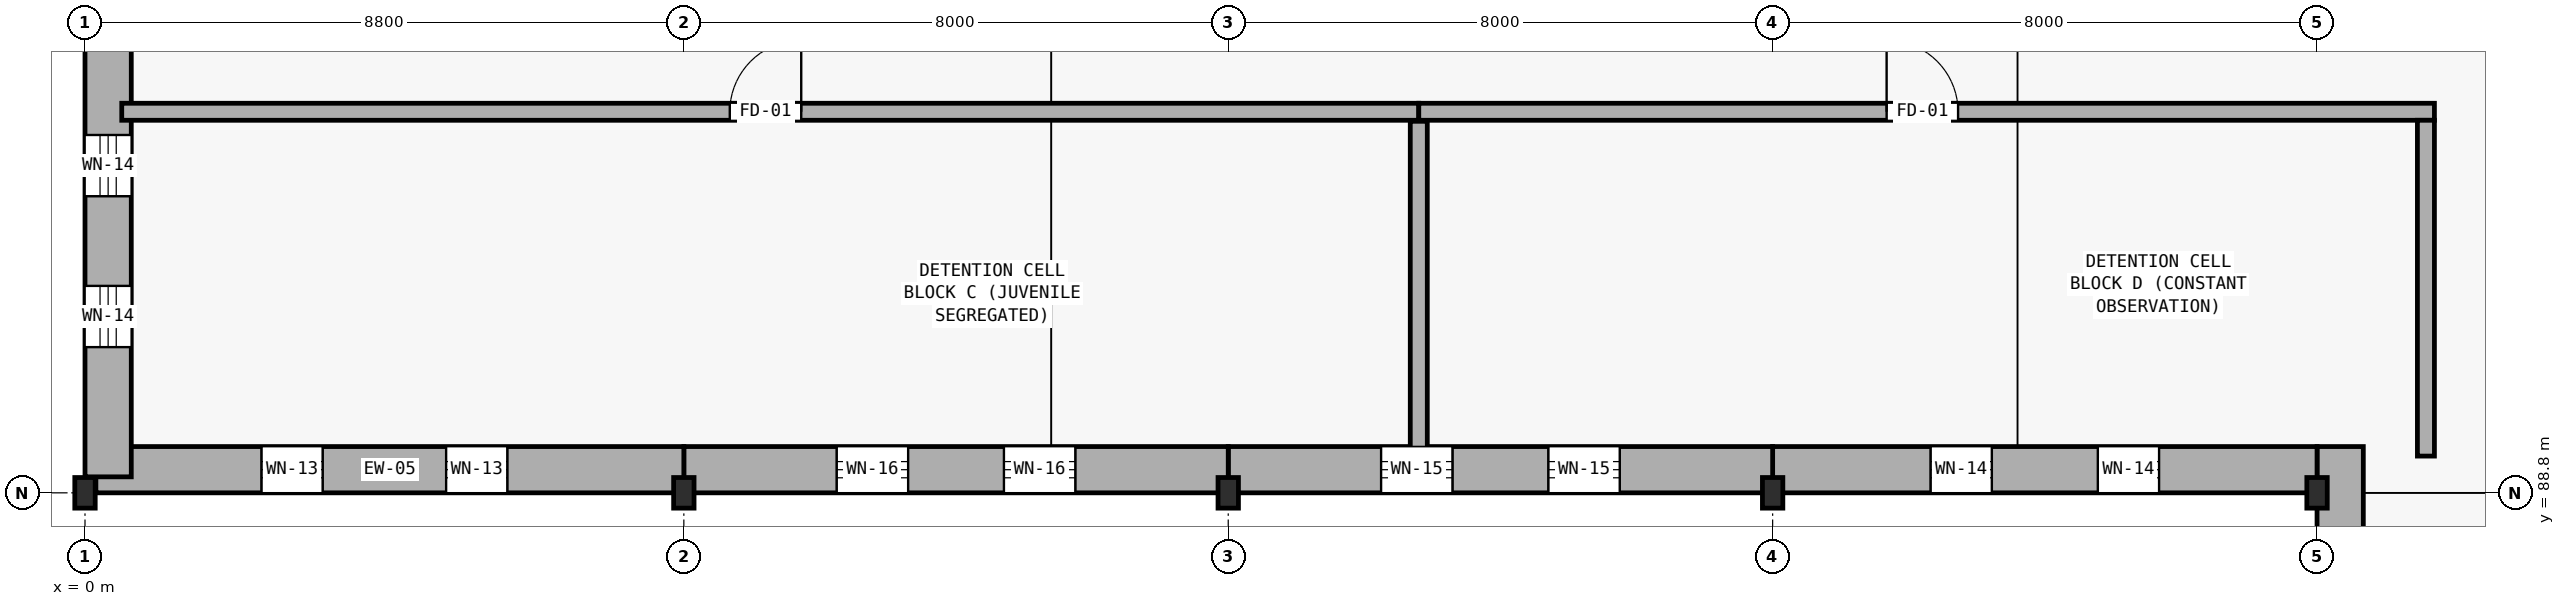
"""IFC4 building model, lengths in metres.
Left out: names, types, materials, properties, quantities, classifications, styles, units other than length and angle.
Written with IfcOpenShell. Run it as: python <this file> out.ifc"""

import sys

from ifc_helpers import new_model, si_unit, direction, frame, frame_2d, origin, origin_2d, place, context, subcontext, project, spatial, rectangle, i_section, extrude, element, fill, save


model = new_model("IFC4")
c1 = context("Model", 3, precision=1e-05, world=origin(), true_north=direction((0.0, 1.0)))
c2 = subcontext(c1, "Body", "Model", "MODEL_VIEW")
j1 = project(units=[si_unit("LENGTHUNIT", "METRE"), si_unit("PLANEANGLEUNIT", "RADIAN")], contexts=[c1])
p1 = place(None, origin())
s1 = spatial("IfcSite", under=j1, at=p1, CompositionType="ELEMENT")
p2 = place(p1, origin())
s2 = spatial("IfcBuilding", under=s1, at=p2, CompositionType="ELEMENT")
p3 = place(p2, frame((0.0, 0.0, 5.4)))
s3 = spatial("IfcBuildingStorey", under=s2, at=p3, CompositionType="ELEMENT", Elevation=5.4)
for number, where, z_axis, x_axis in (
    (1, (0.0, 88.8, 0.0), (0.0, 0.0, 1.0), (1.0, 0.0, 0.0)),
    (2, (8.8, 88.8, 0.0), (0.0, 0.0, 1.0), (1.0, 0.0, 0.0)),
    (3, (16.8, 88.8, 0.0), (0.0, 0.0, 1.0), (1.0, 0.0, 0.0)),
    (4, (24.8, 88.8, 0.0), (0.0, 0.0, 1.0), (1.0, 0.0, 0.0)),
    (5, (32.8, 88.8, 0.0), (0.0, 0.0, 1.0), (1.0, 0.0, 0.0)),
):
    element("IfcColumn", number, at=place(p3, frame(where, z_axis=z_axis, x_axis=x_axis)), inside=s3, PredefinedType="COLUMN", context=c2, shape_type="SweptSolid", body=[
        extrude(i_section(OverallWidth=0.3, OverallDepth=0.45, WebThickness=0.014, FlangeThickness=0.026, FilletRadius=0.027, at=origin_2d()), origin(), (0.0, 0.0, 1.0), 4.5),
    ])
p4 = place(p3, frame((33.14, 81.4, 0.0), z_axis=(0.0, 0.0, 1.0), x_axis=(0.0, 1.0, 0.0)))
e6 = element("IfcWall", 6, at=p4, inside=s3, PredefinedType="SOLIDWALL", context=c2, shape_type="SweptSolid", body=[
    extrude(rectangle(XDim=8.08, YDim=0.68, at=frame_2d((4.04, 0.0))), origin(), (0.0, 0.0, 1.0), 4.22),
])
p5 = place(p4, frame((2.141, 0.0, 1.8)))
e7 = element("IfcOpeningElement", 7, at=p5, cuts=e6, PredefinedType="OPENING", context=c2, shape_type="SweptSolid", body=[
    extrude(rectangle(XDim=0.9, YDim=0.9, at=frame_2d((0.45, 0.45))), frame((0.0, 0.35, 0.0), z_axis=(0.0, -1.0, 0.0), x_axis=(1.0, 0.0, 0.0)), (0.0, 0.0, 1.0), 0.7),
])
p6 = place(p4, frame((4.359, 0.0, 1.8)))
e8 = element("IfcOpeningElement", 8, at=p6, cuts=e6, PredefinedType="OPENING", context=c2, shape_type="SweptSolid", body=[
    extrude(rectangle(XDim=0.9, YDim=0.9, at=frame_2d((0.45, 0.45))), frame((0.0, 0.35, 0.0), z_axis=(0.0, -1.0, 0.0), x_axis=(1.0, 0.0, 0.0)), (0.0, 0.0, 1.0), 0.7),
])
p7 = place(p3, frame((32.8, 89.14, 0.0), z_axis=(0.0, 0.0, 1.0), x_axis=(-1.0, 0.0, 0.0)))
e9 = element("IfcWall", 9, at=p7, inside=s3, PredefinedType="SOLIDWALL", context=c2, shape_type="SweptSolid", body=[
    extrude(rectangle(XDim=8.0, YDim=0.68, at=frame_2d((4.0, 0.0))), origin(), (0.0, 0.0, 1.0), 4.22),
])
p8 = place(p7, frame((2.321, 0.0, 1.8)))
e10 = element("IfcOpeningElement", 10, at=p8, cuts=e9, PredefinedType="OPENING", context=c2, shape_type="SweptSolid", body=[
    extrude(rectangle(XDim=0.9, YDim=1.15, at=frame_2d((0.45, 0.575))), frame((0.0, 0.35, 0.0), z_axis=(0.0, -1.0, 0.0), x_axis=(1.0, 0.0, 0.0)), (0.0, 0.0, 1.0), 0.7),
])
p9 = place(p7, frame((4.779, 0.0, 1.8)))
e11 = element("IfcOpeningElement", 11, at=p9, cuts=e9, PredefinedType="OPENING", context=c2, shape_type="SweptSolid", body=[
    extrude(rectangle(XDim=0.9, YDim=1.15, at=frame_2d((0.45, 0.575))), frame((0.0, 0.35, 0.0), z_axis=(0.0, -1.0, 0.0), x_axis=(1.0, 0.0, 0.0)), (0.0, 0.0, 1.0), 0.7),
])
p10 = place(p3, frame((24.8, 89.14, 0.0), z_axis=(0.0, 0.0, 1.0), x_axis=(-1.0, 0.0, 0.0)))
e12 = element("IfcWall", 12, at=p10, inside=s3, PredefinedType="SOLIDWALL", context=c2, shape_type="SweptSolid", body=[
    extrude(rectangle(XDim=8.0, YDim=0.68, at=frame_2d((4.0, 0.0))), origin(), (0.0, 0.0, 1.0), 4.22),
])
p11 = place(p10, frame((2.246, 0.0, 1.8)))
e13 = element("IfcOpeningElement", 13, at=p11, cuts=e12, PredefinedType="OPENING", context=c2, shape_type="SweptSolid", body=[
    extrude(rectangle(XDim=1.05, YDim=0.95, at=frame_2d((0.525, 0.475))), frame((0.0, 0.35, 0.0), z_axis=(0.0, -1.0, 0.0), x_axis=(1.0, 0.0, 0.0)), (0.0, 0.0, 1.0), 0.7),
])
p12 = place(p10, frame((4.704, 0.0, 1.8)))
e14 = element("IfcOpeningElement", 14, at=p12, cuts=e12, PredefinedType="OPENING", context=c2, shape_type="SweptSolid", body=[
    extrude(rectangle(XDim=1.05, YDim=0.95, at=frame_2d((0.525, 0.475))), frame((0.0, 0.35, 0.0), z_axis=(0.0, -1.0, 0.0), x_axis=(1.0, 0.0, 0.0)), (0.0, 0.0, 1.0), 0.7),
])
p13 = place(p3, frame((16.8, 89.14, 0.0), z_axis=(0.0, 0.0, 1.0), x_axis=(-1.0, 0.0, 0.0)))
e15 = element("IfcWall", 15, at=p13, inside=s3, PredefinedType="SOLIDWALL", context=c2, shape_type="SweptSolid", body=[
    extrude(rectangle(XDim=8.0, YDim=0.68, at=frame_2d((4.0, 0.0))), origin(), (0.0, 0.0, 1.0), 4.22),
])
p14 = place(p13, frame((2.246, 0.0, 1.8)))
e16 = element("IfcOpeningElement", 16, at=p14, cuts=e15, PredefinedType="OPENING", context=c2, shape_type="SweptSolid", body=[
    extrude(rectangle(XDim=1.05, YDim=1.2, at=frame_2d((0.525, 0.6))), frame((0.0, 0.35, 0.0), z_axis=(0.0, -1.0, 0.0), x_axis=(1.0, 0.0, 0.0)), (0.0, 0.0, 1.0), 0.7),
])
p15 = place(p13, frame((4.704, 0.0, 1.8)))
e17 = element("IfcOpeningElement", 17, at=p15, cuts=e15, PredefinedType="OPENING", context=c2, shape_type="SweptSolid", body=[
    extrude(rectangle(XDim=1.05, YDim=1.2, at=frame_2d((0.525, 0.6))), frame((0.0, 0.35, 0.0), z_axis=(0.0, -1.0, 0.0), x_axis=(1.0, 0.0, 0.0)), (0.0, 0.0, 1.0), 0.7),
])
p16 = place(p3, frame((8.8, 89.14, 0.0), z_axis=(0.0, 0.0, 1.0), x_axis=(-1.0, 0.0, 0.0)))
e18 = element("IfcWall", 18, at=p16, inside=s3, PredefinedType="SOLIDWALL", context=c2, shape_type="SweptSolid", body=[
    extrude(rectangle(XDim=8.64, YDim=0.68, at=frame_2d((4.32, 0.0))), origin(), (0.0, 0.0, 1.0), 4.22),
])
p17 = place(p16, frame((2.593, 0.0, 1.8)))
e19 = element("IfcOpeningElement", 19, at=p17, cuts=e18, PredefinedType="OPENING", context=c2, shape_type="SweptSolid", body=[
    extrude(rectangle(XDim=0.9, YDim=0.9, at=frame_2d((0.45, 0.45))), frame((0.0, 0.35, 0.0), z_axis=(0.0, -1.0, 0.0), x_axis=(1.0, 0.0, 0.0)), (0.0, 0.0, 1.0), 0.7),
])
p18 = place(p16, frame((5.307, 0.0, 1.8)))
e20 = element("IfcOpeningElement", 20, at=p18, cuts=e18, PredefinedType="OPENING", context=c2, shape_type="SweptSolid", body=[
    extrude(rectangle(XDim=0.9, YDim=0.9, at=frame_2d((0.45, 0.45))), frame((0.0, 0.35, 0.0), z_axis=(0.0, -1.0, 0.0), x_axis=(1.0, 0.0, 0.0)), (0.0, 0.0, 1.0), 0.7),
])
p19 = place(p3, frame((0.34, 89.035, 0.0), z_axis=(0.0, 0.0, 1.0), x_axis=(0.0, 1.0, 0.0)))
e21 = element("IfcWall", 21, at=p19, inside=s3, PredefinedType="SOLIDWALL", context=c2, shape_type="SweptSolid", body=[
    extrude(rectangle(XDim=7.165, YDim=0.68, at=frame_2d((3.583, 0.0))), origin(), (0.0, 0.0, 1.0), 4.22),
])
p20 = place(p19, frame((1.906, 0.0, 1.8)))
e22 = element("IfcOpeningElement", 22, at=p20, cuts=e21, PredefinedType="OPENING", context=c2, shape_type="SweptSolid", body=[
    extrude(rectangle(XDim=0.9, YDim=1.15, at=frame_2d((0.45, 0.575))), frame((0.0, 0.35, 0.0), z_axis=(0.0, -1.0, 0.0), x_axis=(1.0, 0.0, 0.0)), (0.0, 0.0, 1.0), 0.7),
])
p21 = place(p19, frame((4.124, 0.0, 1.8)))
e23 = element("IfcOpeningElement", 23, at=p21, cuts=e21, PredefinedType="OPENING", context=c2, shape_type="SweptSolid", body=[
    extrude(rectangle(XDim=0.9, YDim=1.15, at=frame_2d((0.45, 0.575))), frame((0.0, 0.35, 0.0), z_axis=(0.0, -1.0, 0.0), x_axis=(1.0, 0.0, 0.0)), (0.0, 0.0, 1.0), 0.7),
])
p22 = place(p3, frame((0.54, 94.4, 0.0), z_axis=(0.0, 0.0, 1.0), x_axis=(1.0, 0.0, 0.0)))
e24 = element("IfcWall", 24, at=p22, inside=s3, PredefinedType="SOLIDWALL", context=c2, shape_type="SweptSolid", body=[
    extrude(rectangle(XDim=19.06, YDim=0.25, at=frame_2d((9.53, 0.0))), origin(), (0.0, 0.0, 1.0), 3.71),
])
p23 = place(p22, frame((8.935, 0.0, 0.0)))
e25 = element("IfcOpeningElement", 25, at=p23, cuts=e24, PredefinedType="OPENING", context=c2, shape_type="SweptSolid", body=[
    extrude(rectangle(XDim=1.05, YDim=2.15, at=frame_2d((0.525, 1.075))), frame((0.0, 0.135, 0.0), z_axis=(0.0, -1.0, 0.0), x_axis=(1.0, 0.0, 0.0)), (0.0, 0.0, 1.0), 0.27),
])
p24 = place(p3, frame((19.6, 89.34, 0.0), z_axis=(0.0, 0.0, 1.0), x_axis=(0.0, 1.0, 0.0)))
e26 = element("IfcWall", 26, at=p24, inside=s3, PredefinedType="SOLIDWALL", context=c2, shape_type="SweptSolid", body=[
    extrude(rectangle(XDim=4.92, YDim=0.25, at=frame_2d((2.46, 0.0))), origin(), (0.0, 0.0, 1.0), 3.84),
])
p25 = place(p3, frame((19.6, 94.4, 0.0), z_axis=(0.0, 0.0, 1.0), x_axis=(1.0, 0.0, 0.0)))
e27 = element("IfcWall", 27, at=p25, inside=s3, PredefinedType="SOLIDWALL", context=c2, shape_type="SweptSolid", body=[
    extrude(rectangle(XDim=14.925, YDim=0.25, at=frame_2d((7.462, 0.0))), origin(), (0.0, 0.0, 1.0), 3.71),
])
p26 = place(p25, frame((6.875, 0.0, 0.0)))
e28 = element("IfcOpeningElement", 28, at=p26, cuts=e27, PredefinedType="OPENING", context=c2, shape_type="SweptSolid", body=[
    extrude(rectangle(XDim=1.05, YDim=2.15, at=frame_2d((0.525, 1.075))), frame((0.0, 0.135, 0.0), z_axis=(0.0, -1.0, 0.0), x_axis=(1.0, 0.0, 0.0)), (0.0, 0.0, 1.0), 0.27),
])
p27 = place(p3, frame((34.4, 89.34, 0.0), z_axis=(0.0, 0.0, 1.0), x_axis=(0.0, 1.0, 0.0)))
e29 = element("IfcWall", 29, at=p27, inside=s3, PredefinedType="SOLIDWALL", context=c2, shape_type="SweptSolid", body=[
    extrude(rectangle(XDim=4.935, YDim=0.25, at=frame_2d((2.467, 0.0))), origin(), (0.0, 0.0, 1.0), 4.17),
])
p28 = place(p8, origin())
e30 = element("IfcWindow", 30, at=p28, inside=s3, PartitioningType="SINGLE_PANEL", PredefinedType="WINDOW", context=c2, shape_type="SweptSolid", body=[
    extrude(rectangle(XDim=0.9, YDim=1.15, at=frame_2d((0.45, 0.575))), frame((0.0, 0.03, 0.0), z_axis=(0.0, -1.0, 0.0), x_axis=(1.0, 0.0, 0.0)), (0.0, 0.0, 1.0), 0.06),
])
fill(e10, e30)
p29 = place(p9, origin())
e31 = element("IfcWindow", 31, at=p29, inside=s3, PartitioningType="SINGLE_PANEL", PredefinedType="WINDOW", context=c2, shape_type="SweptSolid", body=[
    extrude(rectangle(XDim=0.9, YDim=1.15, at=frame_2d((0.45, 0.575))), frame((0.0, 0.03, 0.0), z_axis=(0.0, -1.0, 0.0), x_axis=(1.0, 0.0, 0.0)), (0.0, 0.0, 1.0), 0.06),
])
fill(e11, e31)
p30 = place(p11, origin())
e32 = element("IfcWindow", 32, at=p30, inside=s3, PartitioningType="SINGLE_PANEL", PredefinedType="WINDOW", context=c2, shape_type="SweptSolid", body=[
    extrude(rectangle(XDim=1.05, YDim=0.95, at=frame_2d((0.525, 0.475))), frame((0.0, 0.03, 0.0), z_axis=(0.0, -1.0, 0.0), x_axis=(1.0, 0.0, 0.0)), (0.0, 0.0, 1.0), 0.06),
])
fill(e13, e32)
p31 = place(p12, origin())
e33 = element("IfcWindow", 33, at=p31, inside=s3, PartitioningType="SINGLE_PANEL", PredefinedType="WINDOW", context=c2, shape_type="SweptSolid", body=[
    extrude(rectangle(XDim=1.05, YDim=0.95, at=frame_2d((0.525, 0.475))), frame((0.0, 0.03, 0.0), z_axis=(0.0, -1.0, 0.0), x_axis=(1.0, 0.0, 0.0)), (0.0, 0.0, 1.0), 0.06),
])
fill(e14, e33)
p32 = place(p14, origin())
e34 = element("IfcWindow", 34, at=p32, inside=s3, PartitioningType="SINGLE_PANEL", PredefinedType="WINDOW", context=c2, shape_type="SweptSolid", body=[
    extrude(rectangle(XDim=1.05, YDim=1.2, at=frame_2d((0.525, 0.6))), frame((0.0, 0.03, 0.0), z_axis=(0.0, -1.0, 0.0), x_axis=(1.0, 0.0, 0.0)), (0.0, 0.0, 1.0), 0.06),
])
fill(e16, e34)
p33 = place(p15, origin())
e35 = element("IfcWindow", 35, at=p33, inside=s3, PartitioningType="SINGLE_PANEL", PredefinedType="WINDOW", context=c2, shape_type="SweptSolid", body=[
    extrude(rectangle(XDim=1.05, YDim=1.2, at=frame_2d((0.525, 0.6))), frame((0.0, 0.03, 0.0), z_axis=(0.0, -1.0, 0.0), x_axis=(1.0, 0.0, 0.0)), (0.0, 0.0, 1.0), 0.06),
])
fill(e17, e35)
p34 = place(p17, origin())
e36 = element("IfcWindow", 36, at=p34, inside=s3, PartitioningType="SINGLE_PANEL", PredefinedType="WINDOW", context=c2, shape_type="SweptSolid", body=[
    extrude(rectangle(XDim=0.9, YDim=0.9, at=frame_2d((0.45, 0.45))), frame((0.0, 0.03, 0.0), z_axis=(0.0, -1.0, 0.0), x_axis=(1.0, 0.0, 0.0)), (0.0, 0.0, 1.0), 0.06),
])
fill(e19, e36)
p35 = place(p18, origin())
e37 = element("IfcWindow", 37, at=p35, inside=s3, PartitioningType="SINGLE_PANEL", PredefinedType="WINDOW", context=c2, shape_type="SweptSolid", body=[
    extrude(rectangle(XDim=0.9, YDim=0.9, at=frame_2d((0.45, 0.45))), frame((0.0, 0.03, 0.0), z_axis=(0.0, -1.0, 0.0), x_axis=(1.0, 0.0, 0.0)), (0.0, 0.0, 1.0), 0.06),
])
fill(e20, e37)
p36 = place(p20, origin())
e38 = element("IfcWindow", 38, at=p36, inside=s3, PartitioningType="SINGLE_PANEL", PredefinedType="WINDOW", context=c2, shape_type="SweptSolid", body=[
    extrude(rectangle(XDim=0.9, YDim=1.15, at=frame_2d((0.45, 0.575))), frame((0.0, 0.03, 0.0), z_axis=(0.0, -1.0, 0.0), x_axis=(1.0, 0.0, 0.0)), (0.0, 0.0, 1.0), 0.06),
])
fill(e22, e38)
p37 = place(p21, origin())
e39 = element("IfcWindow", 39, at=p37, inside=s3, PartitioningType="SINGLE_PANEL", PredefinedType="WINDOW", context=c2, shape_type="SweptSolid", body=[
    extrude(rectangle(XDim=0.9, YDim=1.15, at=frame_2d((0.45, 0.575))), frame((0.0, 0.03, 0.0), z_axis=(0.0, -1.0, 0.0), x_axis=(1.0, 0.0, 0.0)), (0.0, 0.0, 1.0), 0.06),
])
fill(e23, e39)
p38 = place(p23, origin())
e40 = element("IfcDoor", 40, at=p38, inside=s3, OperationType="SINGLE_SWING_RIGHT", PredefinedType="DOOR", context=c2, shape_type="SweptSolid", body=[
    extrude(rectangle(XDim=1.05, YDim=2.15, at=frame_2d((0.525, 1.075))), frame((0.0, 0.025, 0.0), z_axis=(0.0, -1.0, 0.0), x_axis=(1.0, 0.0, 0.0)), (0.0, 0.0, 1.0), 0.05),
])
fill(e25, e40)
p39 = place(p26, origin())
e41 = element("IfcDoor", 41, at=p39, inside=s3, OperationType="SINGLE_SWING_LEFT", PredefinedType="DOOR", context=c2, shape_type="SweptSolid", body=[
    extrude(rectangle(XDim=1.05, YDim=2.15, at=frame_2d((0.525, 1.075))), frame((0.0, 0.025, 0.0), z_axis=(0.0, -1.0, 0.0), x_axis=(1.0, 0.0, 0.0)), (0.0, 0.0, 1.0), 0.05),
])
fill(e28, e41)
save(model, sys.argv[1])
